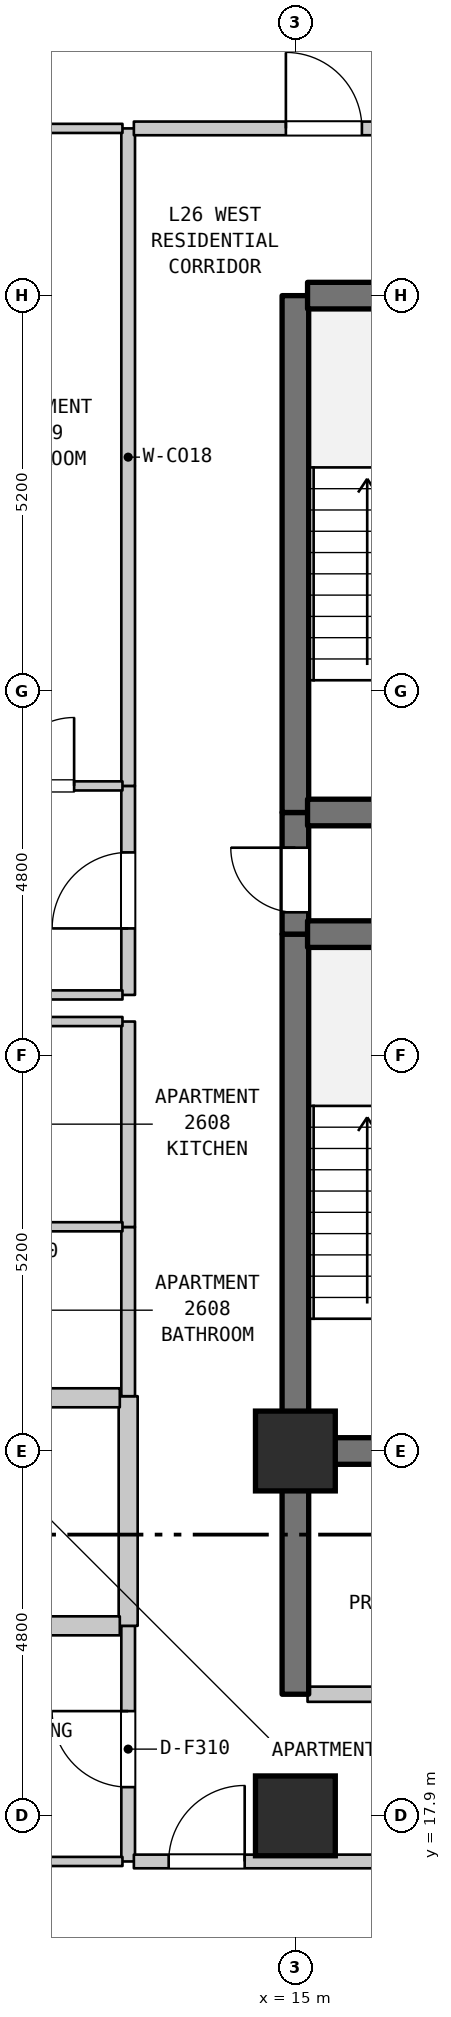
"""IFC4 building model, lengths in metres.
Left out: names, types, materials, properties, quantities, classifications, styles, units other than length and angle.
Written with IfcOpenShell. Run it as: python <this file> out.ifc"""

import sys

from ifc_helpers import new_model, si_unit, direction, frame, frame_2d, origin, origin_2d, place, context, subcontext, project, spatial, rectangle, extrude, element, fill, save


model = new_model("IFC4")
c1 = context("Model", 3, precision=1e-05, world=origin(), true_north=direction((0.0, 1.0)))
c2 = subcontext(c1, "Body", "Model", "MODEL_VIEW")
j1 = project(units=[si_unit("LENGTHUNIT", "METRE"), si_unit("PLANEANGLEUNIT", "RADIAN")], contexts=[c1])
p1 = place(None, origin())
s1 = spatial("IfcSite", under=j1, at=p1, CompositionType="ELEMENT")
p2 = place(p1, origin())
s2 = spatial("IfcBuilding", under=s1, at=p2, CompositionType="ELEMENT")
p3 = place(p2, frame((0.0, 0.0, 109.4)))
s3 = spatial("IfcBuildingStorey", under=s2, at=p3, CompositionType="ELEMENT", Elevation=109.4)
for number, where, z_axis, x_axis in (
    (1, (15.0, 17.9, 0.0), (0.0, 0.0, 1.0), (1.0, 0.0, 0.0)),
    (2, (15.0, 22.7, 0.0), (0.0, 0.0, 1.0), (1.0, 0.0, 0.0)),
):
    element("IfcColumn", number, at=place(p3, frame(where, z_axis=z_axis, x_axis=x_axis)), inside=s3, PredefinedType="COLUMN", context=c2, shape_type="SweptSolid", body=[
        extrude(rectangle(XDim=1.05, YDim=1.05, at=origin_2d()), origin(), (0.0, 0.0, 1.0), 3.7),
    ])
p4 = place(p3, frame((12.8, 17.3, 0.0), z_axis=(0.0, 0.0, 1.0), x_axis=(0.0, 1.0, 0.0)))
e3 = element("IfcWall", 3, at=p4, inside=s3, PredefinedType="STANDARD", context=c2, shape_type="SweptSolid", body=[
    extrude(rectangle(XDim=3.1, YDim=0.18, at=frame_2d((1.55, 0.0))), origin(), (0.0, 0.0, 1.0), 3.385),
])
p5 = place(p4, frame((0.978, 0.0, 0.0)))
e4 = element("IfcOpeningElement", 4, at=p5, cuts=e3, PredefinedType="OPENING", context=c2, shape_type="SweptSolid", body=[
    extrude(rectangle(XDim=1.0, YDim=2.15, at=frame_2d((0.5, 1.075))), frame((0.0, 0.1, 0.0), z_axis=(0.0, -1.0, 0.0), x_axis=(1.0, 0.0, 0.0)), (0.0, 0.0, 1.0), 0.2),
])
p6 = place(p3, frame((12.8, 20.4, 0.0), z_axis=(0.0, 0.0, 1.0), x_axis=(0.0, 1.0, 0.0)))
e5 = element("IfcWall", 5, at=p6, inside=s3, PredefinedType="STANDARD", context=c2, shape_type="SweptSolid", body=[
    extrude(rectangle(XDim=3.021, YDim=0.25, at=frame_2d((1.51, 0.0))), origin(), (0.0, 0.0, 1.0), 3.385),
])
p7 = place(p3, frame((12.8, 23.421, 0.0), z_axis=(0.0, 0.0, 1.0), x_axis=(0.0, 1.0, 0.0)))
e6 = element("IfcWall", 6, at=p7, inside=s3, PredefinedType="STANDARD", context=c2, shape_type="SweptSolid", body=[
    extrude(rectangle(XDim=2.226, YDim=0.18, at=frame_2d((1.113, 0.0))), origin(), (0.0, 0.0, 1.0), 3.385),
])
p8 = place(p3, frame((12.8, 25.647, 0.0), z_axis=(0.0, 0.0, 1.0), x_axis=(0.0, 1.0, 0.0)))
e7 = element("IfcWall", 7, at=p8, inside=s3, PredefinedType="STANDARD", context=c2, shape_type="SweptSolid", body=[
    extrude(rectangle(XDim=2.703, YDim=0.18, at=frame_2d((1.352, 0.0))), origin(), (0.0, 0.0, 1.0), 3.385),
])
p9 = place(p3, frame((12.8, 28.7, 0.0), z_axis=(0.0, 0.0, 1.0), x_axis=(0.0, 1.0, 0.0)))
e8 = element("IfcWall", 8, at=p9, inside=s3, PredefinedType="STANDARD", context=c2, shape_type="SweptSolid", body=[
    extrude(rectangle(XDim=2.75, YDim=0.18, at=frame_2d((1.375, 0.0))), origin(), (0.0, 0.0, 1.0), 3.385),
])
p10 = place(p9, frame((0.875, 0.0, 0.0)))
e9 = element("IfcOpeningElement", 9, at=p10, cuts=e8, PredefinedType="OPENING", context=c2, shape_type="SweptSolid", body=[
    extrude(rectangle(XDim=1.0, YDim=2.15, at=frame_2d((0.5, 1.075))), frame((0.0, 0.1, 0.0), z_axis=(0.0, -1.0, 0.0), x_axis=(1.0, 0.0, 0.0)), (0.0, 0.0, 1.0), 0.2),
])
p11 = place(p3, frame((12.8, 31.45, 0.0), z_axis=(0.0, 0.0, 1.0), x_axis=(0.0, 1.0, 0.0)))
e10 = element("IfcWall", 10, at=p11, inside=s3, PredefinedType="STANDARD", context=c2, shape_type="SweptSolid", body=[
    extrude(rectangle(XDim=8.65, YDim=0.18, at=frame_2d((4.325, 0.0))), origin(), (0.0, 0.0, 1.0), 3.385),
])
p12 = place(p3, frame((15.0, 19.5, 0.0), z_axis=(0.0, 0.0, 1.0), x_axis=(0.0, 1.0, 0.0)))
e11 = element("IfcWall", 11, at=p12, inside=s3, PredefinedType="SHEAR", context=c2, shape_type="SweptSolid", body=[
    extrude(rectangle(XDim=3.2, YDim=0.35, at=frame_2d((1.6, 0.0))), origin(), (0.0, 0.0, 1.0), 3.385),
])
p13 = place(p3, frame((15.0, 22.7, 0.0), z_axis=(0.0, 0.0, 1.0), x_axis=(0.0, 1.0, 0.0)))
e12 = element("IfcWall", 12, at=p13, inside=s3, PredefinedType="SHEAR", context=c2, shape_type="SweptSolid", body=[
    extrude(rectangle(XDim=6.8, YDim=0.35, at=frame_2d((3.4, 0.0))), origin(), (0.0, 0.0, 1.0), 3.385),
])
p14 = place(p3, frame((15.0, 29.5, 0.0), z_axis=(0.0, 0.0, 1.0), x_axis=(0.0, 1.0, 0.0)))
e13 = element("IfcWall", 13, at=p14, inside=s3, PredefinedType="SHEAR", context=c2, shape_type="SweptSolid", body=[
    extrude(rectangle(XDim=1.6, YDim=0.35, at=frame_2d((0.8, 0.0))), origin(), (0.0, 0.0, 1.0), 3.385),
])
p15 = place(p14, frame((0.287, 0.0, 0.0)))
e14 = element("IfcOpeningElement", 14, at=p15, cuts=e13, PredefinedType="OPENING", context=c2, shape_type="SweptSolid", body=[
    extrude(rectangle(XDim=0.85, YDim=2.1, at=frame_2d((0.425, 1.05))), frame((0.0, 0.185, 0.0), z_axis=(0.0, -1.0, 0.0), x_axis=(1.0, 0.0, 0.0)), (0.0, 0.0, 1.0), 0.37),
])
p16 = place(p3, frame((15.0, 31.1, 0.0), z_axis=(0.0, 0.0, 1.0), x_axis=(0.0, 1.0, 0.0)))
e15 = element("IfcWall", 15, at=p16, inside=s3, PredefinedType="SHEAR", context=c2, shape_type="SweptSolid", body=[
    extrude(rectangle(XDim=6.8, YDim=0.35, at=frame_2d((3.4, 0.0))), origin(), (0.0, 0.0, 1.0), 3.385),
])
p17 = place(p3, frame((9.085, 17.3, 0.0), z_axis=(0.0, 0.0, 1.0), x_axis=(1.0, 0.0, 0.0)))
e16 = element("IfcWall", 16, at=p17, inside=s3, PredefinedType="PARTITIONING", context=c2, shape_type="SweptSolid", body=[
    extrude(rectangle(XDim=3.64, YDim=0.12, at=frame_2d((1.82, 0.0))), origin(), (0.0, 0.0, 1.0), 3.385),
])
p18 = place(p3, frame((12.875, 17.3, 0.0), z_axis=(0.0, 0.0, 1.0), x_axis=(1.0, 0.0, 0.0)))
e17 = element("IfcWall", 17, at=p18, inside=s3, PredefinedType="STANDARD", context=c2, shape_type="SweptSolid", body=[
    extrude(rectangle(XDim=3.78, YDim=0.18, at=frame_2d((1.89, 0.0))), origin(), (0.0, 0.0, 1.0), 3.385),
])
p19 = place(p18, frame((0.458, 0.0, 0.0)))
e18 = element("IfcOpeningElement", 18, at=p19, cuts=e17, PredefinedType="OPENING", context=c2, shape_type="SweptSolid", body=[
    extrude(rectangle(XDim=1.0, YDim=2.15, at=frame_2d((0.5, 1.075))), frame((0.0, 0.1, 0.0), z_axis=(0.0, -1.0, 0.0), x_axis=(1.0, 0.0, 0.0)), (0.0, 0.0, 1.0), 0.2),
])
p20 = place(p3, frame((15.16, 19.5, 0.0), z_axis=(0.0, 0.0, 1.0), x_axis=(1.0, 0.0, 0.0)))
e19 = element("IfcWall", 19, at=p20, inside=s3, PredefinedType="STANDARD", context=c2, shape_type="SweptSolid", body=[
    extrude(rectangle(XDim=3.68, YDim=0.2, at=frame_2d((1.84, 0.0))), origin(), (0.0, 0.0, 1.0), 3.385),
])
p21 = place(p20, frame((1.39, 0.0, 0.0)))
e20 = element("IfcOpeningElement", 20, at=p21, cuts=e19, PredefinedType="OPENING", context=c2, shape_type="SweptSolid", body=[
    extrude(rectangle(XDim=0.9, YDim=2.15, at=frame_2d((0.45, 1.075))), frame((0.0, 0.11, 0.0), z_axis=(0.0, -1.0, 0.0), x_axis=(1.0, 0.0, 0.0)), (0.0, 0.0, 1.0), 0.22),
])
p22 = place(p3, frame((10.66, 20.4, 0.0), z_axis=(0.0, 0.0, 1.0), x_axis=(1.0, 0.0, 0.0)))
e21 = element("IfcWall", 21, at=p22, inside=s3, PredefinedType="STANDARD", context=c2, shape_type="SweptSolid", body=[
    extrude(rectangle(XDim=2.03, YDim=0.25, at=frame_2d((1.015, 0.0))), origin(), (0.0, 0.0, 1.0), 3.385),
])
p23 = place(p3, frame((15.16, 22.7, 0.0), z_axis=(0.0, 0.0, 1.0), x_axis=(1.0, 0.0, 0.0)))
e22 = element("IfcWall", 22, at=p23, inside=s3, PredefinedType="SHEAR", context=c2, shape_type="SweptSolid", body=[
    extrude(rectangle(XDim=3.68, YDim=0.35, at=frame_2d((1.84, 0.0))), origin(), (0.0, 0.0, 1.0), 3.385),
])
p24 = place(p3, frame((10.66, 23.4, 0.0), z_axis=(0.0, 0.0, 1.0), x_axis=(1.0, 0.0, 0.0)))
e23 = element("IfcWall", 23, at=p24, inside=s3, PredefinedType="STANDARD", context=c2, shape_type="SweptSolid", body=[
    extrude(rectangle(XDim=2.03, YDim=0.25, at=frame_2d((1.015, 0.0))), origin(), (0.0, 0.0, 1.0), 3.385),
])
for number, where, z_axis, x_axis in (
    (24, (10.595, 25.65, 0.0), (0.0, 0.0, 1.0), (1.0, 0.0, 0.0)),
    (25, (10.595, 28.35, 0.0), (0.0, 0.0, 1.0), (1.0, 0.0, 0.0)),
):
    element("IfcWall", number, at=place(p3, frame(where, z_axis=z_axis, x_axis=x_axis)), inside=s3, PredefinedType="PARTITIONING", context=c2, shape_type="SweptSolid", body=[
        extrude(rectangle(XDim=2.13, YDim=0.12, at=frame_2d((1.065, 0.0))), origin(), (0.0, 0.0, 1.0), 3.385),
    ])
p25 = place(p3, frame((9.03, 28.7, 0.0), z_axis=(0.0, 0.0, 1.0), x_axis=(1.0, 0.0, 0.0)))
e26 = element("IfcWall", 26, at=p25, inside=s3, PredefinedType="PARTITIONING", context=c2, shape_type="SweptSolid", body=[
    extrude(rectangle(XDim=3.695, YDim=0.12, at=frame_2d((1.848, 0.0))), origin(), (0.0, 0.0, 1.0), 3.385),
])
for number, where, z_axis, x_axis in (
    (27, (15.16, 29.5, 0.0), (0.0, 0.0, 1.0), (1.0, 0.0, 0.0)),
    (28, (15.16, 31.1, 0.0), (0.0, 0.0, 1.0), (1.0, 0.0, 0.0)),
):
    element("IfcWall", number, at=place(p3, frame(where, z_axis=z_axis, x_axis=x_axis)), inside=s3, PredefinedType="SHEAR", context=c2, shape_type="SweptSolid", body=[
        extrude(rectangle(XDim=3.68, YDim=0.35, at=frame_2d((1.84, 0.0))), origin(), (0.0, 0.0, 1.0), 3.385),
    ])
p26 = place(p3, frame((10.523, 31.45, 0.0), z_axis=(0.0, 0.0, 1.0), x_axis=(1.0, 0.0, 0.0)))
e29 = element("IfcWall", 29, at=p26, inside=s3, PredefinedType="PARTITIONING", context=c2, shape_type="SweptSolid", body=[
    extrude(rectangle(XDim=2.202, YDim=0.12, at=frame_2d((1.101, 0.0))), origin(), (0.0, 0.0, 1.0), 3.385),
])
p27 = place(p26, frame((0.666, 0.0, 0.0)))
e30 = element("IfcOpeningElement", 30, at=p27, cuts=e29, PredefinedType="OPENING", context=c2, shape_type="SweptSolid", body=[
    extrude(rectangle(XDim=0.9, YDim=2.1, at=frame_2d((0.45, 1.05))), frame((0.0, 0.07, 0.0), z_axis=(0.0, -1.0, 0.0), x_axis=(1.0, 0.0, 0.0)), (0.0, 0.0, 1.0), 0.14),
])
p28 = place(p3, frame((15.16, 37.9, 0.0), z_axis=(0.0, 0.0, 1.0), x_axis=(1.0, 0.0, 0.0)))
e31 = element("IfcWall", 31, at=p28, inside=s3, PredefinedType="SHEAR", context=c2, shape_type="SweptSolid", body=[
    extrude(rectangle(XDim=3.68, YDim=0.35, at=frame_2d((1.84, 0.0))), origin(), (0.0, 0.0, 1.0), 3.385),
])
p29 = place(p3, frame((10.523, 40.1, 0.0), z_axis=(0.0, 0.0, 1.0), x_axis=(1.0, 0.0, 0.0)))
e32 = element("IfcWall", 32, at=p29, inside=s3, PredefinedType="PARTITIONING", context=c2, shape_type="SweptSolid", body=[
    extrude(rectangle(XDim=2.202, YDim=0.12, at=frame_2d((1.101, 0.0))), origin(), (0.0, 0.0, 1.0), 3.385),
])
p30 = place(p3, frame((12.875, 40.1, 0.0), z_axis=(0.0, 0.0, 1.0), x_axis=(1.0, 0.0, 0.0)))
e33 = element("IfcWall", 33, at=p30, inside=s3, PredefinedType="STANDARD", context=c2, shape_type="SweptSolid", body=[
    extrude(rectangle(XDim=5.03, YDim=0.18, at=frame_2d((2.515, 0.0))), origin(), (0.0, 0.0, 1.0), 3.385),
])
p31 = place(p30, frame((2.0, 0.0, 0.0)))
e34 = element("IfcOpeningElement", 34, at=p31, cuts=e33, PredefinedType="OPENING", context=c2, shape_type="SweptSolid", body=[
    extrude(rectangle(XDim=1.0, YDim=2.15, at=frame_2d((0.5, 1.075))), frame((0.0, 0.1, 0.0), z_axis=(0.0, -1.0, 0.0), x_axis=(1.0, 0.0, 0.0)), (0.0, 0.0, 1.0), 0.2),
])
p32 = place(p5, origin())
e35 = element("IfcDoor", 35, at=p32, inside=s3, OperationType="SINGLE_SWING_RIGHT", PredefinedType="DOOR", context=c2, shape_type="SweptSolid", body=[
    extrude(rectangle(XDim=1.0, YDim=2.15, at=frame_2d((0.5, 1.075))), frame((0.0, 0.025, 0.0), z_axis=(0.0, -1.0, 0.0), x_axis=(1.0, 0.0, 0.0)), (0.0, 0.0, 1.0), 0.05),
])
fill(e4, e35)
p33 = place(p10, origin())
e36 = element("IfcDoor", 36, at=p33, inside=s3, OperationType="SINGLE_SWING_LEFT", PredefinedType="DOOR", context=c2, shape_type="SweptSolid", body=[
    extrude(rectangle(XDim=1.0, YDim=2.15, at=frame_2d((0.5, 1.075))), frame((0.0, 0.025, 0.0), z_axis=(0.0, -1.0, 0.0), x_axis=(1.0, 0.0, 0.0)), (0.0, 0.0, 1.0), 0.05),
])
fill(e9, e36)
p34 = place(p15, origin())
e37 = element("IfcDoor", 37, at=p34, inside=s3, OperationType="SINGLE_SWING_RIGHT", PredefinedType="DOOR", context=c2, shape_type="SweptSolid", body=[
    extrude(rectangle(XDim=0.85, YDim=2.1, at=frame_2d((0.425, 1.05))), frame((0.0, 0.025, 0.0), z_axis=(0.0, -1.0, 0.0), x_axis=(1.0, 0.0, 0.0)), (0.0, 0.0, 1.0), 0.05),
])
fill(e14, e37)
p35 = place(p19, origin())
e38 = element("IfcDoor", 38, at=p35, inside=s3, OperationType="SINGLE_SWING_RIGHT", PredefinedType="DOOR", context=c2, shape_type="SweptSolid", body=[
    extrude(rectangle(XDim=1.0, YDim=2.15, at=frame_2d((0.5, 1.075))), frame((0.0, 0.025, 0.0), z_axis=(0.0, -1.0, 0.0), x_axis=(1.0, 0.0, 0.0)), (0.0, 0.0, 1.0), 0.05),
])
fill(e18, e38)
p36 = place(p27, origin())
e39 = element("IfcDoor", 39, at=p36, inside=s3, OperationType="SINGLE_SWING_RIGHT", PredefinedType="DOOR", context=c2, shape_type="SweptSolid", body=[
    extrude(rectangle(XDim=0.9, YDim=2.1, at=frame_2d((0.45, 1.05))), frame((0.0, 0.025, 0.0), z_axis=(0.0, -1.0, 0.0), x_axis=(1.0, 0.0, 0.0)), (0.0, 0.0, 1.0), 0.05),
])
fill(e30, e39)
p37 = place(p31, origin())
e40 = element("IfcDoor", 40, at=p37, inside=s3, OperationType="SINGLE_SWING_LEFT", PredefinedType="DOOR", context=c2, shape_type="SweptSolid", body=[
    extrude(rectangle(XDim=1.0, YDim=2.15, at=frame_2d((0.5, 1.075))), frame((0.0, 0.025, 0.0), z_axis=(0.0, -1.0, 0.0), x_axis=(1.0, 0.0, 0.0)), (0.0, 0.0, 1.0), 0.05),
])
fill(e34, e40)
save(model, sys.argv[1])
